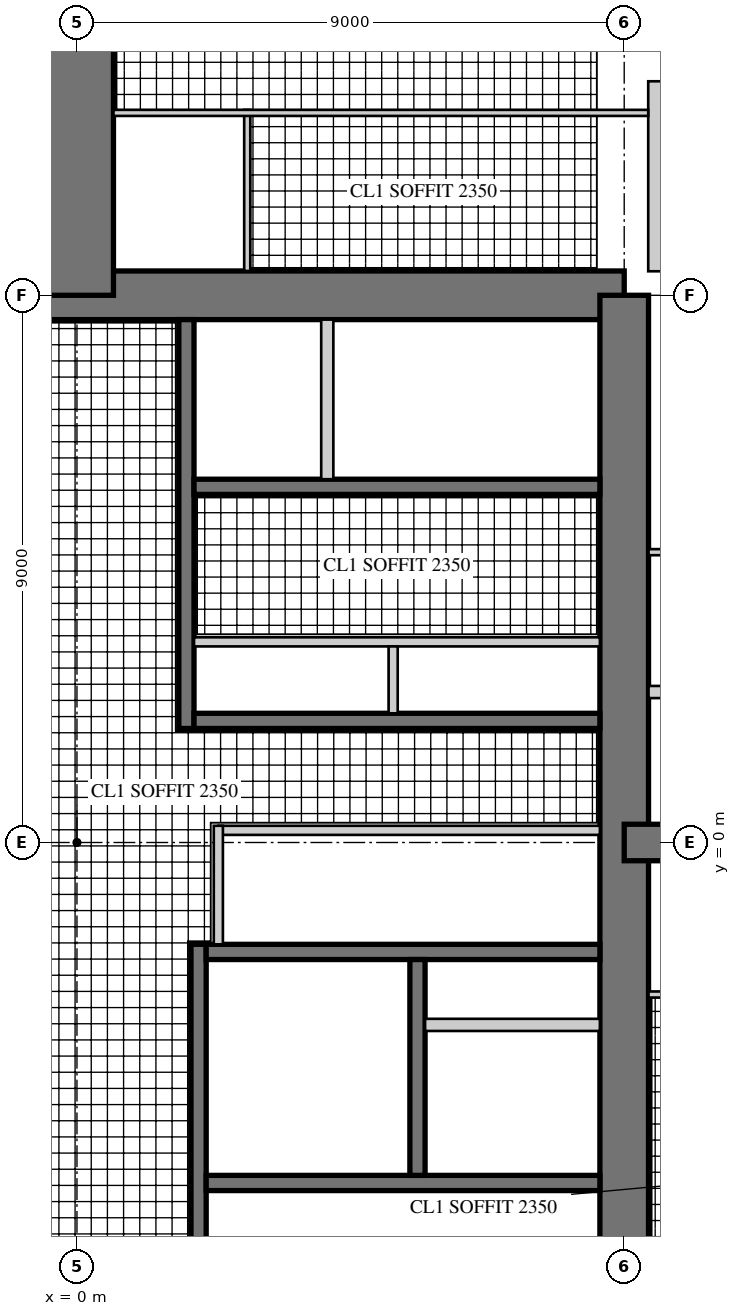
"""IFC4 building model, lengths in metres.
Left out: names, types, materials, properties, quantities, classifications, styles, units other than length and angle.
Written with IfcOpenShell. Run it as: python <this file> out.ifc"""

import sys

from ifc_helpers import new_model, si_unit, direction, frame, frame_2d, origin, place, context, subcontext, project, spatial, rectangle, hollow_rectangle, extrude, element, fill, save


model = new_model("IFC4")
c1 = context("Model", 3, precision=1e-05, world=origin(), true_north=direction((0.0, 1.0)))
c2 = subcontext(c1, "Body", "Model", "MODEL_VIEW")
j1 = project(units=[si_unit("LENGTHUNIT", "METRE"), si_unit("PLANEANGLEUNIT", "RADIAN")], contexts=[c1])
p1 = place(None, origin())
s1 = spatial("IfcSite", under=j1, at=p1, CompositionType="ELEMENT")
p2 = place(p1, origin())
s2 = spatial("IfcBuilding", under=s1, at=p2, CompositionType="ELEMENT")
p3 = place(p2, frame((0.0, 0.0, 242.5)))
s3 = spatial("IfcBuildingStorey", under=s2, at=p3, CompositionType="ELEMENT", Elevation=242.5)
p4 = place(p3, frame((9.0, 9.0, 0.0), z_axis=(0.0, 0.0, 1.0), x_axis=(-1.0, 0.0, 0.0)))
e1 = element("IfcWall", 1, at=p4, inside=s3, PredefinedType="SHEAR", context=c2, shape_type="SweptSolid", body=[
    extrude(rectangle(XDim=18.0, YDim=0.8, at=frame_2d((9.0, 0.0))), origin(), (0.0, 0.0, 1.0), 3.4),
])
p5 = place(p4, frame((9.8, 0.0, 0.0)))
e2 = element("IfcOpeningElement", 2, at=p5, cuts=e1, PredefinedType="OPENING", context=c2, shape_type="SweptSolid", body=[
    extrude(rectangle(XDim=1.0, YDim=2.4, at=frame_2d((0.5, 1.2))), frame((0.0, 0.41, 0.0), z_axis=(0.0, -1.0, 0.0), x_axis=(1.0, 0.0, 0.0)), (0.0, 0.0, 1.0), 0.82),
])
p6 = place(p3, frame((9.0, -9.0, 0.0), z_axis=(0.0, 0.0, 1.0), x_axis=(0.0, 1.0, 0.0)))
e3 = element("IfcWall", 3, at=p6, inside=s3, PredefinedType="SHEAR", context=c2, shape_type="SweptSolid", body=[
    extrude(rectangle(XDim=18.0, YDim=0.8, at=frame_2d((9.0, 0.0))), origin(), (0.0, 0.0, 1.0), 3.4),
])
p7 = place(p6, frame((9.8, 0.0, 0.0)))
e4 = element("IfcOpeningElement", 4, at=p7, cuts=e3, PredefinedType="OPENING", context=c2, shape_type="SweptSolid", body=[
    extrude(rectangle(XDim=1.0, YDim=2.4, at=frame_2d((0.5, 1.2))), frame((0.0, 0.41, 0.0), z_axis=(0.0, -1.0, 0.0), x_axis=(1.0, 0.0, 0.0)), (0.0, 0.0, 1.0), 0.82),
])
p8 = place(p3, frame((1.8, 1.875, 0.0), z_axis=(0.0, 0.0, 1.0), x_axis=(0.0, 1.0, 0.0)))
e5 = element("IfcWall", 5, at=p8, inside=s3, PredefinedType="SHEAR", context=c2, shape_type="SweptSolid", body=[
    extrude(rectangle(XDim=6.725, YDim=0.25, at=frame_2d((3.363, 0.0))), origin(), (0.0, 0.0, 1.0), 3.4),
])
p9 = place(p8, frame((1.875, 0.0, 0.0)))
e6 = element("IfcOpeningElement", 6, at=p9, cuts=e5, PredefinedType="OPENING", context=c2, shape_type="SweptSolid", body=[
    extrude(rectangle(XDim=1.6, YDim=2.4, at=frame_2d((0.8, 1.2))), frame((0.0, 0.135, 0.0), z_axis=(0.0, -1.0, 0.0), x_axis=(1.0, 0.0, 0.0)), (0.0, 0.0, 1.0), 0.27),
])
p10 = place(p3, frame((1.925, 2.0, 0.0), z_axis=(0.0, 0.0, 1.0), x_axis=(1.0, 0.0, 0.0)))
e7 = element("IfcWall", 7, at=p10, inside=s3, PredefinedType="SHEAR", context=c2, shape_type="SweptSolid", body=[
    extrude(rectangle(XDim=6.675, YDim=0.25, at=frame_2d((3.337, 0.0))), origin(), (0.0, 0.0, 1.0), 3.4),
])
p11 = place(p3, frame((1.925, 5.85, 0.0), z_axis=(0.0, 0.0, 1.0), x_axis=(1.0, 0.0, 0.0)))
e8 = element("IfcWall", 8, at=p11, inside=s3, PredefinedType="SHEAR", context=c2, shape_type="SweptSolid", body=[
    extrude(rectangle(XDim=6.675, YDim=0.25, at=frame_2d((3.337, 0.0))), origin(), (0.0, 0.0, 1.0), 3.4),
])
p12 = place(p11, frame((0.546, 0.0, 0.0)))
e9 = element("IfcOpeningElement", 9, at=p12, cuts=e8, PredefinedType="OPENING", context=c2, shape_type="SweptSolid", body=[
    extrude(rectangle(XDim=1.0, YDim=2.1, at=frame_2d((0.5, 1.05))), frame((0.0, 0.135, 0.0), z_axis=(0.0, -1.0, 0.0), x_axis=(1.0, 0.0, 0.0)), (0.0, 0.0, 1.0), 0.27),
])
p13 = place(p11, frame((2.837, 0.0, 0.0)))
e10 = element("IfcOpeningElement", 10, at=p13, cuts=e8, PredefinedType="OPENING", context=c2, shape_type="SweptSolid", body=[
    extrude(rectangle(XDim=1.0, YDim=2.1, at=frame_2d((0.5, 1.05))), frame((0.0, 0.135, 0.0), z_axis=(0.0, -1.0, 0.0), x_axis=(1.0, 0.0, 0.0)), (0.0, 0.0, 1.0), 0.27),
])
p14 = place(p3, frame((1.925, 3.3, 0.0), z_axis=(0.0, 0.0, 1.0), x_axis=(1.0, 0.0, 0.0)))
e11 = element("IfcWall", 11, at=p14, inside=s3, PredefinedType="PARTITIONING", context=c2, shape_type="SweptSolid", body=[
    extrude(rectangle(XDim=6.675, YDim=0.15, at=frame_2d((3.337, 0.0))), origin(), (0.0, 0.0, 1.0), 3.4),
])
p15 = place(p14, frame((0.075, 0.0, 0.0)))
e12 = element("IfcOpeningElement", 12, at=p15, cuts=e11, PredefinedType="OPENING", context=c2, shape_type="SweptSolid", body=[
    extrude(rectangle(XDim=0.8, YDim=2.1, at=frame_2d((0.4, 1.05))), frame((0.0, 0.085, 0.0), z_axis=(0.0, -1.0, 0.0), x_axis=(1.0, 0.0, 0.0)), (0.0, 0.0, 1.0), 0.17),
])
p16 = place(p14, frame((3.675, 0.0, 0.0)))
e13 = element("IfcOpeningElement", 13, at=p16, cuts=e11, PredefinedType="OPENING", context=c2, shape_type="SweptSolid", body=[
    extrude(rectangle(XDim=0.8, YDim=2.1, at=frame_2d((0.4, 1.05))), frame((0.0, 0.085, 0.0), z_axis=(0.0, -1.0, 0.0), x_axis=(1.0, 0.0, 0.0)), (0.0, 0.0, 1.0), 0.17),
])
p17 = place(p3, frame((5.2, 2.125, 0.0), z_axis=(0.0, 0.0, 1.0), x_axis=(0.0, 1.0, 0.0)))
e14 = element("IfcWall", 14, at=p17, inside=s3, PredefinedType="PARTITIONING", context=c2, shape_type="SweptSolid", body=[
    extrude(rectangle(XDim=1.1, YDim=0.15, at=frame_2d((0.55, 0.0))), origin(), (0.0, 0.0, 1.0), 3.4),
])
p18 = place(p3, frame((4.117, 5.975, 0.0), z_axis=(0.0, 0.0, 1.0), x_axis=(0.0, 1.0, 0.0)))
e15 = element("IfcWall", 15, at=p18, inside=s3, PredefinedType="PARTITIONING", context=c2, shape_type="SweptSolid", body=[
    extrude(rectangle(XDim=2.625, YDim=0.2, at=frame_2d((1.312, 0.0))), origin(), (0.0, 0.0, 1.0), 3.4),
])
p19 = place(p3, frame((2.0, -1.675, 0.0), z_axis=(0.0, 0.0, 1.0), x_axis=(0.0, -1.0, 0.0)))
e16 = element("IfcWall", 16, at=p19, inside=s3, PredefinedType="SHEAR", context=c2, shape_type="SweptSolid", body=[
    extrude(rectangle(XDim=6.925, YDim=0.25, at=frame_2d((3.462, 0.0))), origin(), (0.0, 0.0, 1.0), 3.4),
])
p20 = place(p19, frame((0.725, 0.0, 0.0)))
e17 = element("IfcOpeningElement", 17, at=p20, cuts=e16, PredefinedType="OPENING", context=c2, shape_type="SweptSolid", body=[
    extrude(rectangle(XDim=1.0, YDim=2.1, at=frame_2d((0.5, 1.05))), frame((0.0, 0.135, 0.0), z_axis=(0.0, -1.0, 0.0), x_axis=(1.0, 0.0, 0.0)), (0.0, 0.0, 1.0), 0.27),
])
p21 = place(p3, frame((2.125, -1.8, 0.0), z_axis=(0.0, 0.0, 1.0), x_axis=(1.0, 0.0, 0.0)))
e18 = element("IfcWall", 18, at=p21, inside=s3, PredefinedType="SHEAR", context=c2, shape_type="SweptSolid", body=[
    extrude(rectangle(XDim=6.475, YDim=0.25, at=frame_2d((3.238, 0.0))), origin(), (0.0, 0.0, 1.0), 3.4),
])
p22 = place(p3, frame((2.125, -5.6, 0.0), z_axis=(0.0, 0.0, 1.0), x_axis=(1.0, 0.0, 0.0)))
e19 = element("IfcWall", 19, at=p22, inside=s3, PredefinedType="SHEAR", context=c2, shape_type="SweptSolid", body=[
    extrude(rectangle(XDim=6.475, YDim=0.25, at=frame_2d((3.238, 0.0))), origin(), (0.0, 0.0, 1.0), 3.4),
])
p23 = place(p22, frame((0.175, 0.0, 0.0)))
e20 = element("IfcOpeningElement", 20, at=p23, cuts=e19, PredefinedType="OPENING", context=c2, shape_type="SweptSolid", body=[
    extrude(rectangle(XDim=1.0, YDim=2.1, at=frame_2d((0.5, 1.05))), frame((0.0, 0.135, 0.0), z_axis=(0.0, -1.0, 0.0), x_axis=(1.0, 0.0, 0.0)), (0.0, 0.0, 1.0), 0.27),
])
p24 = place(p3, frame((5.6, -1.925, 0.0), z_axis=(0.0, 0.0, 1.0), x_axis=(0.0, -1.0, 0.0)))
e21 = element("IfcWall", 21, at=p24, inside=s3, PredefinedType="SHEAR", context=c2, shape_type="SweptSolid", body=[
    extrude(rectangle(XDim=3.55, YDim=0.25, at=frame_2d((1.775, 0.0))), origin(), (0.0, 0.0, 1.0), 3.4),
])
p25 = place(p24, frame((1.525, 0.0, 0.0)))
e22 = element("IfcOpeningElement", 22, at=p25, cuts=e21, PredefinedType="OPENING", context=c2, shape_type="SweptSolid", body=[
    extrude(rectangle(XDim=1.1, YDim=2.2, at=frame_2d((0.55, 1.1))), frame((0.0, 0.135, 0.0), z_axis=(0.0, -1.0, 0.0), x_axis=(1.0, 0.0, 0.0)), (0.0, 0.0, 1.0), 0.27),
])
p26 = place(p24, frame((0.075, 0.0, 0.0)))
e23 = element("IfcOpeningElement", 23, at=p26, cuts=e21, PredefinedType="OPENING", context=c2, shape_type="SweptSolid", body=[
    extrude(rectangle(XDim=0.8, YDim=2.1, at=frame_2d((0.4, 1.05))), frame((0.0, 0.135, 0.0), z_axis=(0.0, -1.0, 0.0), x_axis=(1.0, 0.0, 0.0)), (0.0, 0.0, 1.0), 0.27),
])
p27 = place(p3, frame((5.725, -3.0, 0.0), z_axis=(0.0, 0.0, 1.0), x_axis=(1.0, 0.0, 0.0)))
e24 = element("IfcWall", 24, at=p27, inside=s3, PredefinedType="PARTITIONING", context=c2, shape_type="SweptSolid", body=[
    extrude(rectangle(XDim=2.875, YDim=0.2, at=frame_2d((1.438, 0.0))), origin(), (0.0, 0.0, 1.0), 3.4),
])
p28 = place(p3, frame((0.0, 9.0, 0.0), z_axis=(0.0, 0.0, 1.0), x_axis=(0.0, 1.0, 0.0)))
e25 = element("IfcWall", 25, at=p28, inside=s3, PredefinedType="SHEAR", context=c2, shape_type="SweptSolid", body=[
    extrude(rectangle(XDim=9.0, YDim=1.2, at=frame_2d((4.5, 0.0))), origin(), (0.0, 0.0, 1.0), 3.4),
])
p29 = place(p28, frame((3.8, 0.0, 0.0)))
e26 = element("IfcOpeningElement", 26, at=p29, cuts=e25, PredefinedType="OPENING", context=c2, shape_type="SweptSolid", body=[
    extrude(rectangle(XDim=1.0, YDim=2.15, at=frame_2d((0.5, 1.075))), frame((0.0, 0.61, 0.0), z_axis=(0.0, -1.0, 0.0), x_axis=(1.0, 0.0, 0.0)), (0.0, 0.0, 1.0), 1.22),
])
p30 = place(p28, frame((7.0, 0.0, 0.0)))
e27 = element("IfcOpeningElement", 27, at=p30, cuts=e25, PredefinedType="OPENING", context=c2, shape_type="SweptSolid", body=[
    extrude(rectangle(XDim=1.0, YDim=2.2, at=frame_2d((0.5, 1.1))), frame((0.0, 0.61, 0.0), z_axis=(0.0, -1.0, 0.0), x_axis=(1.0, 0.0, 0.0)), (0.0, 0.0, 1.0), 1.22),
])
p31 = place(p3, frame((9.0, 0.0, 0.0), z_axis=(0.0, 0.0, 1.0), x_axis=(1.0, 0.0, 0.0)))
e28 = element("IfcWall", 28, at=p31, inside=s3, PredefinedType="SHEAR", context=c2, shape_type="SweptSolid", body=[
    extrude(rectangle(XDim=9.0, YDim=0.6, at=frame_2d((4.5, 0.0))), origin(), (0.0, 0.0, 1.0), 3.4),
])
p32 = place(p31, frame((3.8, 0.0, 0.0)))
e29 = element("IfcOpeningElement", 29, at=p32, cuts=e28, PredefinedType="OPENING", context=c2, shape_type="SweptSolid", body=[
    extrude(rectangle(XDim=1.0, YDim=2.15, at=frame_2d((0.5, 1.075))), frame((0.0, 0.31, 0.0), z_axis=(0.0, -1.0, 0.0), x_axis=(1.0, 0.0, 0.0)), (0.0, 0.0, 1.0), 0.62),
])
p33 = place(p31, frame((7.0, 0.0, 0.0)))
e30 = element("IfcOpeningElement", 30, at=p33, cuts=e28, PredefinedType="OPENING", context=c2, shape_type="SweptSolid", body=[
    extrude(rectangle(XDim=1.0, YDim=2.2, at=frame_2d((0.5, 1.1))), frame((0.0, 0.31, 0.0), z_axis=(0.0, -1.0, 0.0), x_axis=(1.0, 0.0, 0.0)), (0.0, 0.0, 1.0), 0.62),
])
p34 = place(p3, frame((9.52, 9.395, 0.0), z_axis=(0.0, 0.0, 1.0), x_axis=(0.0, 1.0, 0.0)))
e31 = element("IfcWall", 31, at=p34, inside=s3, PredefinedType="SOLIDWALL", context=c2, shape_type="SweptSolid", body=[
    extrude(rectangle(XDim=3.125, YDim=0.25, at=frame_2d((1.562, 0.0))), origin(), (0.0, 0.0, 1.0), 3.22),
])
p35 = place(p34, frame((0.6, 0.0, 0.0)))
e32 = element("IfcOpeningElement", 32, at=p35, cuts=e31, PredefinedType="OPENING", context=c2, shape_type="SweptSolid", body=[
    extrude(rectangle(XDim=1.0, YDim=2.2, at=frame_2d((0.5, 1.1))), frame((0.0, 0.135, 0.0), z_axis=(0.0, -1.0, 0.0), x_axis=(1.0, 0.0, 0.0)), (0.0, 0.0, 1.0), 0.27),
])
p36 = place(p3, frame((2.325, 0.2, 0.0), z_axis=(0.0, 0.0, 1.0), x_axis=(1.0, 0.0, 0.0)))
e33 = element("IfcWall", 33, at=p36, inside=s3, PredefinedType="PARTITIONING", context=c2, shape_type="SweptSolid", body=[
    extrude(rectangle(XDim=6.275, YDim=0.15, at=frame_2d((3.138, 0.0))), origin(), (0.0, 0.0, 1.0), 3.22),
])
p37 = place(p36, frame((0.4, 0.0, 0.0)))
e34 = element("IfcOpeningElement", 34, at=p37, cuts=e33, PredefinedType="OPENING", context=c2, shape_type="SweptSolid", body=[
    extrude(rectangle(XDim=1.0, YDim=2.1, at=frame_2d((0.5, 1.05))), frame((0.0, 0.085, 0.0), z_axis=(0.0, -1.0, 0.0), x_axis=(1.0, 0.0, 0.0)), (0.0, 0.0, 1.0), 0.17),
])
p38 = place(p3, frame((2.325, -1.675, 0.0), z_axis=(0.0, 0.0, 1.0), x_axis=(0.0, 1.0, 0.0)))
e35 = element("IfcWall", 35, at=p38, inside=s3, PredefinedType="PARTITIONING", context=c2, shape_type="SweptSolid", body=[
    extrude(rectangle(XDim=1.95, YDim=0.15, at=frame_2d((0.975, 0.0))), origin(), (0.0, 0.0, 1.0), 3.22),
])
p39 = place(p3, frame((2.8, 9.4, 0.0), z_axis=(0.0, 0.0, 1.0), x_axis=(0.0, 1.0, 0.0)))
e36 = element("IfcWall", 36, at=p39, inside=s3, PredefinedType="PARTITIONING", context=c2, shape_type="SweptSolid", body=[
    extrude(rectangle(XDim=2.65, YDim=0.1, at=frame_2d((1.325, 0.0))), origin(), (0.0, 0.0, 1.0), 3.22),
])
p40 = place(p3, frame((9.395, 12.0, 0.0), z_axis=(0.0, 0.0, 1.0), x_axis=(-1.0, 0.0, 0.0)))
e37 = element("IfcWall", 37, at=p40, inside=s3, PredefinedType="PARTITIONING", context=c2, shape_type="SweptSolid", body=[
    extrude(rectangle(XDim=8.795, YDim=0.1, at=frame_2d((4.397, 0.0))), origin(), (0.0, 0.0, 1.0), 3.22),
])
p41 = place(p40, frame((5.245, 0.0, 0.0)))
e38 = element("IfcOpeningElement", 38, at=p41, cuts=e37, PredefinedType="OPENING", context=c2, shape_type="SweptSolid", body=[
    extrude(rectangle(XDim=0.9, YDim=2.1, at=frame_2d((0.45, 1.05))), frame((0.0, 0.06, 0.0), z_axis=(0.0, -1.0, 0.0), x_axis=(1.0, 0.0, 0.0)), (0.0, 0.0, 1.0), 0.12),
])
p42 = place(p40, frame((7.345, 0.0, 0.0)))
e39 = element("IfcOpeningElement", 39, at=p42, cuts=e37, PredefinedType="OPENING", context=c2, shape_type="SweptSolid", body=[
    extrude(rectangle(XDim=0.9, YDim=2.1, at=frame_2d((0.45, 1.05))), frame((0.0, 0.06, 0.0), z_axis=(0.0, -1.0, 0.0), x_axis=(1.0, 0.0, 0.0)), (0.0, 0.0, 1.0), 0.12),
])
p43 = place(p3, frame((9.4, 4.775, 0.0), z_axis=(0.0, 0.0, 1.0), x_axis=(1.0, 0.0, 0.0)))
e40 = element("IfcWall", 40, at=p43, inside=s3, PredefinedType="PARTITIONING", context=c2, shape_type="SweptSolid", body=[
    extrude(rectangle(XDim=3.25, YDim=0.1, at=frame_2d((1.625, 0.0))), origin(), (0.0, 0.0, 1.0), 3.22),
])
p44 = place(p3, frame((9.4, -2.5, 0.0), z_axis=(0.0, 0.0, 1.0), x_axis=(1.0, 0.0, 0.0)))
e41 = element("IfcWall", 41, at=p44, inside=s3, PredefinedType="PARTITIONING", context=c2, shape_type="SweptSolid", body=[
    extrude(rectangle(XDim=2.65, YDim=0.1, at=frame_2d((1.325, 0.0))), origin(), (0.0, 0.0, 1.0), 3.22),
])
p45 = place(p3, frame((9.4, 2.475, 0.0), z_axis=(0.0, 0.0, 1.0), x_axis=(1.0, 0.0, 0.0)))
e42 = element("IfcWall", 42, at=p45, inside=s3, PredefinedType="SOLIDWALL", context=c2, shape_type="SweptSolid", body=[
    extrude(rectangle(XDim=5.6, YDim=0.2, at=frame_2d((2.8, 0.0))), origin(), (0.0, 0.0, 1.0), 3.22),
])
p46 = place(p45, frame((3.75, 0.0, 0.0)))
e43 = element("IfcOpeningElement", 43, at=p46, cuts=e42, PredefinedType="OPENING", context=c2, shape_type="SweptSolid", body=[
    extrude(rectangle(XDim=1.0, YDim=2.15, at=frame_2d((0.5, 1.075))), frame((0.0, 0.11, 0.0), z_axis=(0.0, -1.0, 0.0), x_axis=(1.0, 0.0, 0.0)), (0.0, 0.0, 1.0), 0.22),
])
p47 = place(p35, origin())
e44 = element("IfcDoor", 44, at=p47, inside=s3, OperationType="SINGLE_SWING_RIGHT", PredefinedType="DOOR", context=c2, shape_type="SweptSolid", body=[
    extrude(hollow_rectangle(XDim=1.0, YDim=2.2, WallThickness=0.06, at=frame_2d((0.5, 1.1))), frame((0.0, 0.025, 0.0), z_axis=(0.0, -1.0, 0.0), x_axis=(1.0, 0.0, 0.0)), (0.0, 0.0, 1.0), 0.05),
    extrude(rectangle(XDim=0.879, YDim=2.079, at=frame_2d((0.5, 1.1))), frame((0.0, 0.025, 0.0), z_axis=(0.0, -1.0, 0.0), x_axis=(1.0, 0.0, 0.0)), (0.0, 0.0, 1.0), 0.05),
])
fill(e32, e44)
p48 = place(p37, frame((1.0, 0.0, 0.0), z_axis=(0.0, 0.0, 1.0), x_axis=(-1.0, 0.0, 0.0)))
e45 = element("IfcDoor", 45, at=p48, inside=s3, OperationType="SINGLE_SWING_RIGHT", PredefinedType="DOOR", context=c2, shape_type="SweptSolid", body=[
    extrude(rectangle(XDim=1.0, YDim=2.1, at=frame_2d((0.5, 1.05))), frame((0.0, 0.025, 0.0), z_axis=(0.0, -1.0, 0.0), x_axis=(1.0, 0.0, 0.0)), (0.0, 0.0, 1.0), 0.05),
])
fill(e34, e45)
p49 = place(p41, origin())
e46 = element("IfcDoor", 46, at=p49, inside=s3, OperationType="SINGLE_SWING_RIGHT", PredefinedType="DOOR", context=c2, shape_type="SweptSolid", body=[
    extrude(rectangle(XDim=0.9, YDim=2.1, at=frame_2d((0.45, 1.05))), frame((0.0, 0.025, 0.0), z_axis=(0.0, -1.0, 0.0), x_axis=(1.0, 0.0, 0.0)), (0.0, 0.0, 1.0), 0.05),
])
fill(e38, e46)
p50 = place(p42, origin())
e47 = element("IfcDoor", 47, at=p50, inside=s3, OperationType="SINGLE_SWING_RIGHT", PredefinedType="DOOR", context=c2, shape_type="SweptSolid", body=[
    extrude(rectangle(XDim=0.9, YDim=2.1, at=frame_2d((0.45, 1.05))), frame((0.0, 0.025, 0.0), z_axis=(0.0, -1.0, 0.0), x_axis=(1.0, 0.0, 0.0)), (0.0, 0.0, 1.0), 0.05),
])
fill(e39, e47)
p51 = place(p29, frame((1.0, 0.0, 0.0), z_axis=(0.0, 0.0, 1.0), x_axis=(-1.0, 0.0, 0.0)))
e48 = element("IfcDoor", 48, at=p51, inside=s3, OperationType="SINGLE_SWING_RIGHT", PredefinedType="DOOR", context=c2, shape_type="SweptSolid", body=[
    extrude(rectangle(XDim=1.0, YDim=2.15, at=frame_2d((0.5, 1.075))), frame((0.0, 0.025, 0.0), z_axis=(0.0, -1.0, 0.0), x_axis=(1.0, 0.0, 0.0)), (0.0, 0.0, 1.0), 0.05),
])
fill(e26, e48)
p52 = place(p7, origin())
e49 = element("IfcDoor", 49, at=p52, inside=s3, OperationType="SINGLE_SWING_RIGHT", PredefinedType="DOOR", context=c2, shape_type="SweptSolid", body=[
    extrude(rectangle(XDim=1.0, YDim=2.4, at=frame_2d((0.5, 1.2))), frame((0.0, 0.055, 0.0), z_axis=(0.0, -1.0, 0.0), x_axis=(1.0, 0.0, 0.0)), (0.0, 0.0, 1.0), 0.05),
])
fill(e4, e49)
p53 = place(p9, frame((1.6, 0.0, 0.0), z_axis=(0.0, 0.0, 1.0), x_axis=(-1.0, 0.0, 0.0)))
e50 = element("IfcDoor", 50, at=p53, inside=s3, OperationType="DOUBLE_DOOR_SINGLE_SWING", PredefinedType="DOOR", context=c2, shape_type="SweptSolid", body=[
    extrude(rectangle(XDim=1.6, YDim=2.4, at=frame_2d((0.8, 1.2))), frame((0.0, 0.025, 0.0), z_axis=(0.0, -1.0, 0.0), x_axis=(1.0, 0.0, 0.0)), (0.0, 0.0, 1.0), 0.05),
])
fill(e6, e50)
p54 = place(p15, frame((0.8, 0.0, 0.0), z_axis=(0.0, 0.0, 1.0), x_axis=(-1.0, 0.0, 0.0)))
e51 = element("IfcDoor", 51, at=p54, inside=s3, OperationType="SINGLE_SWING_RIGHT", PredefinedType="DOOR", context=c2, shape_type="SweptSolid", body=[
    extrude(rectangle(XDim=0.8, YDim=2.1, at=frame_2d((0.4, 1.05))), frame((0.0, 0.025, 0.0), z_axis=(0.0, -1.0, 0.0), x_axis=(1.0, 0.0, 0.0)), (0.0, 0.0, 1.0), 0.05),
])
fill(e12, e51)
p55 = place(p16, frame((0.8, 0.0, 0.0), z_axis=(0.0, 0.0, 1.0), x_axis=(-1.0, 0.0, 0.0)))
e52 = element("IfcDoor", 52, at=p55, inside=s3, OperationType="SINGLE_SWING_RIGHT", PredefinedType="DOOR", context=c2, shape_type="SweptSolid", body=[
    extrude(rectangle(XDim=0.8, YDim=2.1, at=frame_2d((0.4, 1.05))), frame((0.0, 0.025, 0.0), z_axis=(0.0, -1.0, 0.0), x_axis=(1.0, 0.0, 0.0)), (0.0, 0.0, 1.0), 0.05),
])
fill(e13, e52)
p56 = place(p20, origin())
e53 = element("IfcDoor", 53, at=p56, inside=s3, OperationType="SINGLE_SWING_LEFT", PredefinedType="DOOR", context=c2, shape_type="SweptSolid", body=[
    extrude(rectangle(XDim=1.0, YDim=2.1, at=frame_2d((0.5, 1.05))), frame((0.0, 0.025, 0.0), z_axis=(0.0, -1.0, 0.0), x_axis=(1.0, 0.0, 0.0)), (0.0, 0.0, 1.0), 0.05),
])
fill(e17, e53)
p57 = place(p23, frame((1.0, 0.0, 0.0), z_axis=(0.0, 0.0, 1.0), x_axis=(-1.0, 0.0, 0.0)))
e54 = element("IfcDoor", 54, at=p57, inside=s3, OperationType="SINGLE_SWING_RIGHT", PredefinedType="DOOR", context=c2, shape_type="SweptSolid", body=[
    extrude(rectangle(XDim=1.0, YDim=2.1, at=frame_2d((0.5, 1.05))), frame((0.0, 0.025, 0.0), z_axis=(0.0, -1.0, 0.0), x_axis=(1.0, 0.0, 0.0)), (0.0, 0.0, 1.0), 0.05),
])
fill(e20, e54)
p58 = place(p25, origin())
e55 = element("IfcDoor", 55, at=p58, inside=s3, OperationType="DOUBLE_DOOR_SLIDING", PredefinedType="DOOR", context=c2, shape_type="SweptSolid", body=[
    extrude(rectangle(XDim=1.1, YDim=2.2, at=frame_2d((0.55, 1.1))), frame((0.0, 0.025, 0.0), z_axis=(0.0, -1.0, 0.0), x_axis=(1.0, 0.0, 0.0)), (0.0, 0.0, 1.0), 0.05),
])
fill(e22, e55)
p59 = place(p26, origin())
e56 = element("IfcDoor", 56, at=p59, inside=s3, OperationType="SINGLE_SWING_LEFT", PredefinedType="DOOR", context=c2, shape_type="SweptSolid", body=[
    extrude(rectangle(XDim=0.8, YDim=2.1, at=frame_2d((0.4, 1.05))), frame((0.0, 0.025, 0.0), z_axis=(0.0, -1.0, 0.0), x_axis=(1.0, 0.0, 0.0)), (0.0, 0.0, 1.0), 0.05),
])
fill(e23, e56)
p60 = place(p12, origin())
e57 = element("IfcDoor", 57, at=p60, inside=s3, OperationType="SINGLE_SWING_LEFT", PredefinedType="DOOR", context=c2, shape_type="SweptSolid", body=[
    extrude(rectangle(XDim=1.0, YDim=2.1, at=frame_2d((0.5, 1.05))), frame((0.0, 0.025, 0.0), z_axis=(0.0, -1.0, 0.0), x_axis=(1.0, 0.0, 0.0)), (0.0, 0.0, 1.0), 0.05),
])
fill(e9, e57)
p61 = place(p13, origin())
e58 = element("IfcDoor", 58, at=p61, inside=s3, OperationType="SINGLE_SWING_LEFT", PredefinedType="DOOR", context=c2, shape_type="SweptSolid", body=[
    extrude(rectangle(XDim=1.0, YDim=2.1, at=frame_2d((0.5, 1.05))), frame((0.0, 0.025, 0.0), z_axis=(0.0, -1.0, 0.0), x_axis=(1.0, 0.0, 0.0)), (0.0, 0.0, 1.0), 0.05),
])
fill(e10, e58)
save(model, sys.argv[1])
